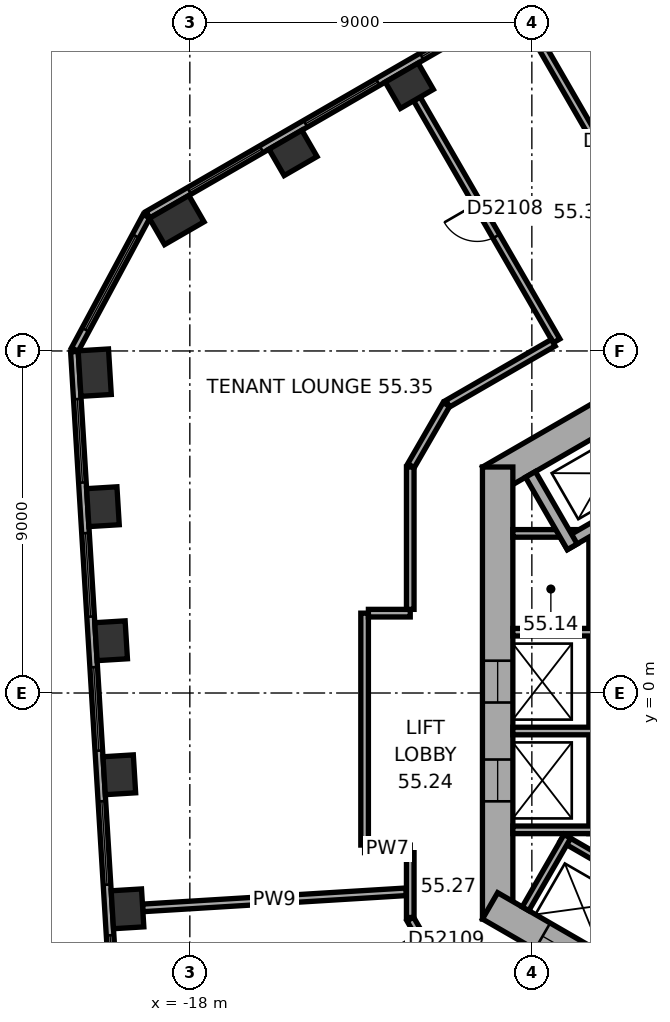
"""IFC4 building model, lengths in metres.
Left out: names, types, materials, properties, quantities, classifications, styles, units other than length and angle.
Written with IfcOpenShell. Run it as: python <this file> out.ifc"""

import sys

from ifc_helpers import new_model, si_unit, direction, frame, frame_2d, origin, origin_2d, place, context, subcontext, project, spatial, rectangle, extrude, element, fill, save


model = new_model("IFC4")
c1 = context("Model", 3, precision=1e-05, world=origin(), true_north=direction((0.0, 1.0)))
c2 = subcontext(c1, "Body", "Model", "MODEL_VIEW")
j1 = project(units=[si_unit("LENGTHUNIT", "METRE"), si_unit("PLANEANGLEUNIT", "RADIAN")], contexts=[c1])
p1 = place(None, origin())
s1 = spatial("IfcSite", under=j1, at=p1, CompositionType="ELEMENT")
p2 = place(p1, origin())
s2 = spatial("IfcBuilding", under=s1, at=p2, CompositionType="ELEMENT")
p3 = place(p2, frame((0.0, 0.0, 225.4)))
s3 = spatial("IfcBuildingStorey", under=s2, at=p3, CompositionType="ELEMENT", Elevation=225.4)
for number, where, z_axis, x_axis in (
    (1, (-12.225, 15.978, 0.0), (0.0, 0.0, 1.0), (-0.866, -0.5, 0.0)),
    (2, (-15.285, 14.211, 0.0), (0.0, 0.0, 1.0), (-0.866, -0.5, 0.0)),
):
    element("IfcColumn", number, at=place(p3, frame(where, z_axis=z_axis, x_axis=x_axis)), inside=s3, PredefinedType="COLUMN", context=c2, shape_type="SweptSolid", body=[
        extrude(rectangle(XDim=1.0, YDim=0.8, at=origin_2d()), origin(), (0.0, 0.0, 1.0), 3.7),
    ])
for number, where, z_axis, x_axis in (
    (3, (-18.345, 12.445, 0.0), (0.0, 0.0, 1.0), (-0.866, -0.5, 0.0)),
    (4, (-20.503, 8.429, 0.0), (0.0, 0.0, 1.0), (0.061, -0.998, 0.0)),
):
    element("IfcColumn", number, at=place(p3, frame(where, z_axis=z_axis, x_axis=x_axis)), inside=s3, PredefinedType="COLUMN", context=c2, shape_type="SweptSolid", body=[
        extrude(rectangle(XDim=1.2, YDim=0.8, at=origin_2d()), origin(), (0.0, 0.0, 1.0), 3.7),
    ])
for number, where, z_axis, x_axis in (
    (5, (-20.287, 4.902, 0.0), (0.0, 0.0, 1.0), (0.061, -0.998, 0.0)),
    (6, (-20.071, 1.375, 0.0), (0.0, 0.0, 1.0), (0.061, -0.998, 0.0)),
    (7, (-19.856, -2.152, 0.0), (0.0, 0.0, 1.0), (0.061, -0.998, 0.0)),
    (8, (-19.64, -5.679, 0.0), (0.0, 0.0, 1.0), (0.061, -0.998, 0.0)),
):
    element("IfcColumn", number, at=place(p3, frame(where, z_axis=z_axis, x_axis=x_axis)), inside=s3, PredefinedType="COLUMN", context=c2, shape_type="SweptSolid", body=[
        extrude(rectangle(XDim=1.0, YDim=0.8, at=origin_2d()), origin(), (0.0, 0.0, 1.0), 3.7),
    ])
p4 = place(p3, frame((0.2, 11.547, 0.0), z_axis=(0.0, 0.0, 1.0), x_axis=(-0.866023897231, -0.500002609418, 0.0)))
e9 = element("IfcWall", 9, at=p4, inside=s3, PredefinedType="SHEAR", context=c2, shape_type="SweptSolid", body=[
    extrude(rectangle(XDim=11.894, YDim=0.8, at=frame_2d((5.947, 0.0))), origin(), (0.0, 0.0, 1.0), 3.7),
])
p5 = place(p4, frame((6.147, 0.0, 0.0)))
e10 = element("IfcOpeningElement", 10, at=p5, cuts=e9, PredefinedType="OPENING", context=c2, shape_type="SweptSolid", body=[
    extrude(rectangle(XDim=1.5, YDim=2.1, at=frame_2d((0.75, 1.05))), frame((0.0, 0.41, 0.0), z_axis=(0.0, -1.0, 0.0), x_axis=(1.0, 0.0, 0.0)), (0.0, 0.0, 1.0), 0.82),
])
p6 = place(p4, frame((2.997, 0.0, 0.0)))
e11 = element("IfcOpeningElement", 11, at=p6, cuts=e9, PredefinedType="OPENING", context=c2, shape_type="SweptSolid", body=[
    extrude(rectangle(XDim=0.9, YDim=2.1, at=frame_2d((0.45, 1.05))), frame((0.0, 0.41, 0.0), z_axis=(0.0, -1.0, 0.0), x_axis=(1.0, 0.0, 0.0)), (0.0, 0.0, 1.0), 0.82),
])
p7 = place(p3, frame((-9.9, 5.947, 0.0), z_axis=(0.0, 0.0, 1.0), x_axis=(0.0, -1.0, 0.0)))
e12 = element("IfcWall", 12, at=p7, inside=s3, PredefinedType="SHEAR", context=c2, shape_type="SweptSolid", body=[
    extrude(rectangle(XDim=11.894, YDim=0.8, at=frame_2d((5.947, 0.0))), origin(), (0.0, 0.0, 1.0), 3.7),
])
p8 = place(p7, frame((5.097, 0.0, 0.0)))
e13 = element("IfcOpeningElement", 13, at=p8, cuts=e12, PredefinedType="OPENING", context=c2, shape_type="SweptSolid", body=[
    extrude(rectangle(XDim=1.1, YDim=2.1, at=frame_2d((0.55, 1.05))), frame((0.0, 0.41, 0.0), z_axis=(0.0, -1.0, 0.0), x_axis=(1.0, 0.0, 0.0)), (0.0, 0.0, 1.0), 0.82),
])
p9 = place(p7, frame((7.697, 0.0, 0.0)))
e14 = element("IfcOpeningElement", 14, at=p9, cuts=e12, PredefinedType="OPENING", context=c2, shape_type="SweptSolid", body=[
    extrude(rectangle(XDim=1.1, YDim=2.1, at=frame_2d((0.55, 1.05))), frame((0.0, 0.41, 0.0), z_axis=(0.0, -1.0, 0.0), x_axis=(1.0, 0.0, 0.0)), (0.0, 0.0, 1.0), 0.82),
])
p10 = place(p3, frame((-10.1, -5.6, 0.0), z_axis=(0.0, 0.0, 1.0), x_axis=(0.866023897231, -0.500002609418, 0.0)))
e15 = element("IfcWall", 15, at=p10, inside=s3, PredefinedType="SHEAR", context=c2, shape_type="SweptSolid", body=[
    extrude(rectangle(XDim=11.894, YDim=0.8, at=frame_2d((5.947, 0.0))), origin(), (0.0, 0.0, 1.0), 3.7),
])
p11 = place(p10, frame((6.147, 0.0, 0.0)))
e16 = element("IfcOpeningElement", 16, at=p11, cuts=e15, PredefinedType="OPENING", context=c2, shape_type="SweptSolid", body=[
    extrude(rectangle(XDim=1.5, YDim=2.1, at=frame_2d((0.75, 1.05))), frame((0.0, 0.41, 0.0), z_axis=(0.0, -1.0, 0.0), x_axis=(1.0, 0.0, 0.0)), (0.0, 0.0, 1.0), 0.82),
])
p12 = place(p10, frame((1.597, 0.0, 0.0)))
e17 = element("IfcOpeningElement", 17, at=p12, cuts=e15, PredefinedType="OPENING", context=c2, shape_type="SweptSolid", body=[
    extrude(rectangle(XDim=1.1, YDim=2.1, at=frame_2d((0.55, 1.05))), frame((0.0, 0.41, 0.0), z_axis=(0.0, -1.0, 0.0), x_axis=(1.0, 0.0, 0.0)), (0.0, 0.0, 1.0), 0.82),
])
p13 = place(p10, frame((4.197, 0.0, 0.0)))
e18 = element("IfcOpeningElement", 18, at=p13, cuts=e15, PredefinedType="OPENING", context=c2, shape_type="SweptSolid", body=[
    extrude(rectangle(XDim=1.1, YDim=2.1, at=frame_2d((0.55, 1.05))), frame((0.0, 0.41, 0.0), z_axis=(0.0, -1.0, 0.0), x_axis=(1.0, 0.0, 0.0)), (0.0, 0.0, 1.0), 0.82),
])
p14 = place(p3, frame((-2.786, 22.005, 0.0), z_axis=(0.0, 0.0, 1.0), x_axis=(-0.866026555358, -0.49999800541, 0.0)))
e19 = element("IfcWall", 19, at=p14, inside=s3, PredefinedType="STANDARD", context=c2, shape_type="SweptSolid", body=[
    extrude(rectangle(XDim=18.841, YDim=0.2, at=frame_2d((9.421, 0.0))), origin(), (0.0, 0.0, 1.0), 3.7),
])
p15 = place(p14, frame((1.254, 0.0, 0.9)))
e20 = element("IfcOpeningElement", 20, at=p15, cuts=e19, PredefinedType="OPENING", context=c2, shape_type="SweptSolid", body=[
    extrude(rectangle(XDim=2.2, YDim=2.0, at=frame_2d((1.1, 1.0))), frame((0.0, 0.11, 0.0), z_axis=(0.0, -1.0, 0.0), x_axis=(1.0, 0.0, 0.0)), (0.0, 0.0, 1.0), 0.22),
])
p16 = place(p14, frame((4.788, 0.0, 0.9)))
e21 = element("IfcOpeningElement", 21, at=p16, cuts=e19, PredefinedType="OPENING", context=c2, shape_type="SweptSolid", body=[
    extrude(rectangle(XDim=2.2, YDim=2.0, at=frame_2d((1.1, 1.0))), frame((0.0, 0.11, 0.0), z_axis=(0.0, -1.0, 0.0), x_axis=(1.0, 0.0, 0.0)), (0.0, 0.0, 1.0), 0.22),
])
p17 = place(p14, frame((8.321, 0.0, 0.9)))
e22 = element("IfcOpeningElement", 22, at=p17, cuts=e19, PredefinedType="OPENING", context=c2, shape_type="SweptSolid", body=[
    extrude(rectangle(XDim=2.2, YDim=2.0, at=frame_2d((1.1, 1.0))), frame((0.0, 0.11, 0.0), z_axis=(0.0, -1.0, 0.0), x_axis=(1.0, 0.0, 0.0)), (0.0, 0.0, 1.0), 0.22),
])
p18 = place(p14, frame((11.855, 0.0, 0.9)))
e23 = element("IfcOpeningElement", 23, at=p18, cuts=e19, PredefinedType="OPENING", context=c2, shape_type="SweptSolid", body=[
    extrude(rectangle(XDim=2.2, YDim=2.0, at=frame_2d((1.1, 1.0))), frame((0.0, 0.11, 0.0), z_axis=(0.0, -1.0, 0.0), x_axis=(1.0, 0.0, 0.0)), (0.0, 0.0, 1.0), 0.22),
])
p19 = place(p14, frame((15.389, 0.0, 0.9)))
e24 = element("IfcOpeningElement", 24, at=p19, cuts=e19, PredefinedType="OPENING", context=c2, shape_type="SweptSolid", body=[
    extrude(rectangle(XDim=2.2, YDim=2.0, at=frame_2d((1.1, 1.0))), frame((0.0, 0.11, 0.0), z_axis=(0.0, -1.0, 0.0), x_axis=(1.0, 0.0, 0.0)), (0.0, 0.0, 1.0), 0.22),
])
p20 = place(p3, frame((-19.141, 12.545, 0.0), z_axis=(0.0, 0.0, 1.0), x_axis=(-0.473306370921, -0.880897882416, 0.0)))
e25 = element("IfcWall", 25, at=p20, inside=s3, PredefinedType="STANDARD", context=c2, shape_type="SweptSolid", body=[
    extrude(rectangle(XDim=3.983, YDim=0.2, at=frame_2d((1.991, 0.0))), origin(), (0.0, 0.0, 1.0), 3.7),
])
p21 = place(p20, frame((0.591, 0.0, 0.9)))
e26 = element("IfcOpeningElement", 26, at=p21, cuts=e25, PredefinedType="OPENING", context=c2, shape_type="SweptSolid", body=[
    extrude(rectangle(XDim=2.8, YDim=2.0, at=frame_2d((1.4, 1.0))), frame((0.0, 0.11, 0.0), z_axis=(0.0, -1.0, 0.0), x_axis=(1.0, 0.0, 0.0)), (0.0, 0.0, 1.0), 0.22),
])
p22 = place(p3, frame((-21.038, 8.984, 0.0), z_axis=(0.0, 0.0, 1.0), x_axis=(0.061043935634, -0.998135079998, 0.0)))
e27 = element("IfcWall", 27, at=p22, inside=s3, PredefinedType="STANDARD", context=c2, shape_type="SweptSolid", body=[
    extrude(rectangle(XDim=18.841, YDim=0.2, at=frame_2d((9.421, 0.0))), origin(), (0.0, 0.0, 1.0), 3.7),
])
p23 = place(p22, frame((1.253, 0.0, 0.9)))
e28 = element("IfcOpeningElement", 28, at=p23, cuts=e27, PredefinedType="OPENING", context=c2, shape_type="SweptSolid", body=[
    extrude(rectangle(XDim=2.2, YDim=2.0, at=frame_2d((1.1, 1.0))), frame((0.0, 0.11, 0.0), z_axis=(0.0, -1.0, 0.0), x_axis=(1.0, 0.0, 0.0)), (0.0, 0.0, 1.0), 0.22),
])
p24 = place(p22, frame((4.786, 0.0, 0.9)))
e29 = element("IfcOpeningElement", 29, at=p24, cuts=e27, PredefinedType="OPENING", context=c2, shape_type="SweptSolid", body=[
    extrude(rectangle(XDim=2.2, YDim=2.0, at=frame_2d((1.1, 1.0))), frame((0.0, 0.11, 0.0), z_axis=(0.0, -1.0, 0.0), x_axis=(1.0, 0.0, 0.0)), (0.0, 0.0, 1.0), 0.22),
])
p25 = place(p22, frame((8.32, 0.0, 0.9)))
e30 = element("IfcOpeningElement", 30, at=p25, cuts=e27, PredefinedType="OPENING", context=c2, shape_type="SweptSolid", body=[
    extrude(rectangle(XDim=2.2, YDim=2.0, at=frame_2d((1.1, 1.0))), frame((0.0, 0.11, 0.0), z_axis=(0.0, -1.0, 0.0), x_axis=(1.0, 0.0, 0.0)), (0.0, 0.0, 1.0), 0.22),
])
p26 = place(p22, frame((11.854, 0.0, 0.9)))
e31 = element("IfcOpeningElement", 31, at=p26, cuts=e27, PredefinedType="OPENING", context=c2, shape_type="SweptSolid", body=[
    extrude(rectangle(XDim=2.2, YDim=2.0, at=frame_2d((1.1, 1.0))), frame((0.0, 0.11, 0.0), z_axis=(0.0, -1.0, 0.0), x_axis=(1.0, 0.0, 0.0)), (0.0, 0.0, 1.0), 0.22),
])
p27 = place(p22, frame((15.387, 0.0, 0.9)))
e32 = element("IfcOpeningElement", 32, at=p27, cuts=e27, PredefinedType="OPENING", context=c2, shape_type="SweptSolid", body=[
    extrude(rectangle(XDim=2.2, YDim=2.0, at=frame_2d((1.1, 1.0))), frame((0.0, 0.11, 0.0), z_axis=(0.0, -1.0, 0.0), x_axis=(1.0, 0.0, 0.0)), (0.0, 0.0, 1.0), 0.22),
])
p28 = place(p3, frame((-7.4, 4.3, 0.0), z_axis=(0.0, 0.0, 1.0), x_axis=(0.0, -1.0, 0.0)))
e33 = element("IfcWall", 33, at=p28, inside=s3, PredefinedType="PARTITIONING", context=c2, shape_type="SweptSolid", body=[
    extrude(rectangle(XDim=8.0, YDim=0.2, at=frame_2d((4.0, 0.0))), origin(), (0.0, 0.0, 1.0), 3.42),
])
for number, where, z_axis, x_axis in (
    (34, (-7.3, 4.2, 0.0), (0.0, 0.0, 1.0), (-1.0, 0.0, 0.0)),
    (35, (-7.3, 1.6, 0.0), (0.0, 0.0, 1.0), (-1.0, 0.0, 0.0)),
    (36, (-7.3, -1.0, 0.0), (0.0, 0.0, 1.0), (-1.0, 0.0, 0.0)),
    (37, (-7.3, -3.6, 0.0), (0.0, 0.0, 1.0), (-1.0, 0.0, 0.0)),
):
    element("IfcWall", number, at=place(p3, frame(where, z_axis=z_axis, x_axis=x_axis)), inside=s3, PredefinedType="PARTITIONING", context=c2, shape_type="SweptSolid", body=[
        extrude(rectangle(XDim=2.2, YDim=0.2, at=frame_2d((1.1, 0.0))), origin(), (0.0, 0.0, 1.0), 3.42),
    ])
p29 = place(p3, frame((-8.203, -3.809, 0.0), z_axis=(0.0, 0.0, 1.0), x_axis=(0.866028230842, -0.499995103361, 0.0)))
e38 = element("IfcWall", 38, at=p29, inside=s3, PredefinedType="PARTITIONING", context=c2, shape_type="SweptSolid", body=[
    extrude(rectangle(XDim=5.4, YDim=0.2, at=frame_2d((2.7, 0.0))), origin(), (0.0, 0.0, 1.0), 3.42),
])
p30 = place(p3, frame((-8.067, -3.772, 0.0), z_axis=(0.0, 0.0, 1.0), x_axis=(-0.50002983664, -0.866008176907, 0.0)))
e39 = element("IfcWall", 39, at=p30, inside=s3, PredefinedType="PARTITIONING", context=c2, shape_type="SweptSolid", body=[
    extrude(rectangle(XDim=2.2, YDim=0.2, at=frame_2d((1.1, 0.0))), origin(), (0.0, 0.0, 1.0), 3.42),
])
p31 = place(p3, frame((-5.24, 5.577, 0.0), z_axis=(0.0, 0.0, 1.0), x_axis=(-0.866014461049, -0.500018952895, 0.0)))
e40 = element("IfcWall", 40, at=p31, inside=s3, PredefinedType="SHEAR", context=c2, shape_type="SweptSolid", body=[
    extrude(rectangle(XDim=3.35, YDim=0.3, at=frame_2d((1.675, 0.0))), origin(), (0.0, 0.0, 1.0), 3.42),
])
p32 = place(p3, frame((-7.937, 3.847, 0.0), z_axis=(0.0, 0.0, 1.0), x_axis=(-0.50002983664, 0.866008176907, 0.0)))
e41 = element("IfcWall", 41, at=p32, inside=s3, PredefinedType="SHEAR", context=c2, shape_type="SweptSolid", body=[
    extrude(rectangle(XDim=2.2, YDim=0.3, at=frame_2d((1.1, 0.0))), origin(), (0.0, 0.0, 1.0), 3.42),
])
p33 = place(p3, frame((-19.241, -5.654, 0.0), z_axis=(0.0, 0.0, 1.0), x_axis=(0.998135538818, 0.061036432963, 0.0)))
e42 = element("IfcWall", 42, at=p33, inside=s3, PredefinedType="PARTITIONING", context=c2, shape_type="SweptSolid", body=[
    extrude(rectangle(XDim=6.944, YDim=0.2, at=frame_2d((3.472, 0.0))), origin(), (0.0, 0.0, 1.0), 2.87),
])
p34 = place(p3, frame((-13.401, -4.101, 0.0), z_axis=(0.0, 0.0, 1.0), x_axis=(1.0, 0.0, 0.0)))
e43 = element("IfcWall", 43, at=p34, inside=s3, PredefinedType="PARTITIONING", context=c2, shape_type="SweptSolid", body=[
    extrude(rectangle(XDim=1.201, YDim=0.2, at=frame_2d((0.601, 0.0))), origin(), (0.0, 0.0, 1.0), 3.42),
])
p35 = place(p3, frame((-13.401, 2.101, 0.0), z_axis=(0.0, 0.0, 1.0), x_axis=(0.0, -1.0, 0.0)))
e44 = element("IfcWall", 44, at=p35, inside=s3, PredefinedType="PARTITIONING", context=c2, shape_type="SweptSolid", body=[
    extrude(rectangle(XDim=6.102, YDim=0.2, at=frame_2d((3.051, 0.0))), origin(), (0.0, 0.0, 1.0), 3.42),
])
p36 = place(p3, frame((-12.2, -5.947, 0.0), z_axis=(0.0, 0.0, 1.0), x_axis=(0.500022797313, -0.86601224135, 0.0)))
e45 = element("IfcWall", 45, at=p36, inside=s3, PredefinedType="PARTITIONING", context=c2, shape_type="SweptSolid", body=[
    extrude(rectangle(XDim=1.9, YDim=0.2, at=frame_2d((0.95, 0.0))), origin(), (0.0, 0.0, 1.0), 3.42),
])
p37 = place(p36, frame((0.45, 0.0, 0.0)))
e46 = element("IfcOpeningElement", 46, at=p37, cuts=e45, PredefinedType="OPENING", context=c2, shape_type="SweptSolid", body=[
    extrude(rectangle(XDim=1.0, YDim=2.1, at=frame_2d((0.5, 1.05))), frame((0.0, 0.11, 0.0), z_axis=(0.0, -1.0, 0.0), x_axis=(1.0, 0.0, 0.0)), (0.0, 0.0, 1.0), 0.22),
])
p38 = place(p3, frame((-12.2, -4.201, 0.0), z_axis=(0.0, 0.0, 1.0), x_axis=(0.0, -1.0, 0.0)))
e47 = element("IfcWall", 47, at=p38, inside=s3, PredefinedType="PARTITIONING", context=c2, shape_type="SweptSolid", body=[
    extrude(rectangle(XDim=1.706, YDim=0.2, at=frame_2d((0.853, 0.0))), origin(), (0.0, 0.0, 1.0), 3.42),
])
p39 = place(p3, frame((-12.2, 2.101, 0.0), z_axis=(0.0, 0.0, 1.0), x_axis=(-1.0, 0.0, 0.0)))
e48 = element("IfcWall", 48, at=p39, inside=s3, PredefinedType="PARTITIONING", context=c2, shape_type="SweptSolid", body=[
    extrude(rectangle(XDim=1.101, YDim=0.2, at=frame_2d((0.551, 0.0))), origin(), (0.0, 0.0, 1.0), 3.42),
])
p40 = place(p3, frame((-12.2, 5.947, 0.0), z_axis=(0.0, 0.0, 1.0), x_axis=(0.0, -1.0, 0.0)))
e49 = element("IfcWall", 49, at=p40, inside=s3, PredefinedType="PARTITIONING", context=c2, shape_type="SweptSolid", body=[
    extrude(rectangle(XDim=3.746, YDim=0.2, at=frame_2d((1.873, 0.0))), origin(), (0.0, 0.0, 1.0), 3.42),
])
p41 = place(p3, frame((-12.025, 15.632, 0.0), z_axis=(0.0, 0.0, 1.0), x_axis=(0.499983153418, -0.866035129944, 0.0)))
e50 = element("IfcWall", 50, at=p41, inside=s3, PredefinedType="PARTITIONING", context=c2, shape_type="SweptSolid", body=[
    extrude(rectangle(XDim=7.35, YDim=0.2, at=frame_2d((3.675, 0.0))), origin(), (0.0, 0.0, 1.0), 3.42),
])
p42 = place(p41, frame((3.175, 0.0, 0.0)))
e51 = element("IfcOpeningElement", 51, at=p42, cuts=e50, PredefinedType="OPENING", context=c2, shape_type="SweptSolid", body=[
    extrude(rectangle(XDim=1.0, YDim=2.1, at=frame_2d((0.5, 1.05))), frame((0.0, 0.11, 0.0), z_axis=(0.0, -1.0, 0.0), x_axis=(1.0, 0.0, 0.0)), (0.0, 0.0, 1.0), 0.22),
])
p43 = place(p3, frame((-11.25, 7.592, 0.0), z_axis=(0.0, 0.0, 1.0), x_axis=(-0.499964847546, -0.866045698112, 0.0)))
e52 = element("IfcWall", 52, at=p43, inside=s3, PredefinedType="PARTITIONING", context=c2, shape_type="SweptSolid", body=[
    extrude(rectangle(XDim=1.86, YDim=0.2, at=frame_2d((0.93, 0.0))), origin(), (0.0, 0.0, 1.0), 3.42),
])
p44 = place(p3, frame((-8.965, 17.399, 0.0), z_axis=(0.0, 0.0, 1.0), x_axis=(0.499993683172, -0.866029050776, 0.0)))
e53 = element("IfcWall", 53, at=p44, inside=s3, PredefinedType="PARTITIONING", context=c2, shape_type="SweptSolid", body=[
    extrude(rectangle(XDim=7.35, YDim=0.2, at=frame_2d((3.675, 0.0))), origin(), (0.0, 0.0, 1.0), 2.87),
])
p45 = place(p44, frame((3.175, 0.0, 0.0)))
e54 = element("IfcOpeningElement", 54, at=p45, cuts=e53, PredefinedType="OPENING", context=c2, shape_type="SweptSolid", body=[
    extrude(rectangle(XDim=1.0, YDim=2.1, at=frame_2d((0.5, 1.05))), frame((0.0, 0.11, 0.0), z_axis=(0.0, -1.0, 0.0), x_axis=(1.0, 0.0, 0.0)), (0.0, 0.0, 1.0), 0.22),
])
p46 = place(p3, frame((-8.437, 9.217, 0.0), z_axis=(0.0, 0.0, 1.0), x_axis=(-0.866005660673, -0.500034194513, 0.0)))
e55 = element("IfcWall", 55, at=p46, inside=s3, PredefinedType="PARTITIONING", context=c2, shape_type="SweptSolid", body=[
    extrude(rectangle(XDim=3.209, YDim=0.2, at=frame_2d((1.604, 0.0))), origin(), (0.0, 0.0, 1.0), 3.42),
])
p47 = place(p17, origin())
e56 = element("IfcWindow", 56, at=p47, inside=s3, PartitioningType="SINGLE_PANEL", PredefinedType="WINDOW", context=c2, shape_type="SweptSolid", body=[
    extrude(rectangle(XDim=2.2, YDim=2.0, at=frame_2d((1.1, 1.0))), frame((0.0, 0.03, 0.0), z_axis=(0.0, -1.0, 0.0), x_axis=(1.0, 0.0, 0.0)), (0.0, 0.0, 1.0), 0.06),
])
fill(e22, e56)
p48 = place(p18, origin())
e57 = element("IfcWindow", 57, at=p48, inside=s3, PartitioningType="SINGLE_PANEL", PredefinedType="WINDOW", context=c2, shape_type="SweptSolid", body=[
    extrude(rectangle(XDim=2.2, YDim=2.0, at=frame_2d((1.1, 1.0))), frame((0.0, 0.03, 0.0), z_axis=(0.0, -1.0, 0.0), x_axis=(1.0, 0.0, 0.0)), (0.0, 0.0, 1.0), 0.06),
])
fill(e23, e57)
p49 = place(p19, origin())
e58 = element("IfcWindow", 58, at=p49, inside=s3, PartitioningType="SINGLE_PANEL", PredefinedType="WINDOW", context=c2, shape_type="SweptSolid", body=[
    extrude(rectangle(XDim=2.2, YDim=2.0, at=frame_2d((1.1, 1.0))), frame((0.0, 0.03, 0.0), z_axis=(0.0, -1.0, 0.0), x_axis=(1.0, 0.0, 0.0)), (0.0, 0.0, 1.0), 0.06),
])
fill(e24, e58)
p50 = place(p21, origin())
e59 = element("IfcWindow", 59, at=p50, inside=s3, PartitioningType="SINGLE_PANEL", PredefinedType="WINDOW", context=c2, shape_type="SweptSolid", body=[
    extrude(rectangle(XDim=2.8, YDim=2.0, at=frame_2d((1.4, 1.0))), frame((0.0, 0.03, 0.0), z_axis=(0.0, -1.0, 0.0), x_axis=(1.0, 0.0, 0.0)), (0.0, 0.0, 1.0), 0.06),
])
fill(e26, e59)
p51 = place(p23, origin())
e60 = element("IfcWindow", 60, at=p51, inside=s3, PartitioningType="SINGLE_PANEL", PredefinedType="WINDOW", context=c2, shape_type="SweptSolid", body=[
    extrude(rectangle(XDim=2.2, YDim=2.0, at=frame_2d((1.1, 1.0))), frame((0.0, 0.03, 0.0), z_axis=(0.0, -1.0, 0.0), x_axis=(1.0, 0.0, 0.0)), (0.0, 0.0, 1.0), 0.06),
])
fill(e28, e60)
p52 = place(p24, origin())
e61 = element("IfcWindow", 61, at=p52, inside=s3, PartitioningType="SINGLE_PANEL", PredefinedType="WINDOW", context=c2, shape_type="SweptSolid", body=[
    extrude(rectangle(XDim=2.2, YDim=2.0, at=frame_2d((1.1, 1.0))), frame((0.0, 0.03, 0.0), z_axis=(0.0, -1.0, 0.0), x_axis=(1.0, 0.0, 0.0)), (0.0, 0.0, 1.0), 0.06),
])
fill(e29, e61)
p53 = place(p25, origin())
e62 = element("IfcWindow", 62, at=p53, inside=s3, PartitioningType="SINGLE_PANEL", PredefinedType="WINDOW", context=c2, shape_type="SweptSolid", body=[
    extrude(rectangle(XDim=2.2, YDim=2.0, at=frame_2d((1.1, 1.0))), frame((0.0, 0.03, 0.0), z_axis=(0.0, -1.0, 0.0), x_axis=(1.0, 0.0, 0.0)), (0.0, 0.0, 1.0), 0.06),
])
fill(e30, e62)
p54 = place(p26, origin())
e63 = element("IfcWindow", 63, at=p54, inside=s3, PartitioningType="SINGLE_PANEL", PredefinedType="WINDOW", context=c2, shape_type="SweptSolid", body=[
    extrude(rectangle(XDim=2.2, YDim=2.0, at=frame_2d((1.1, 1.0))), frame((0.0, 0.03, 0.0), z_axis=(0.0, -1.0, 0.0), x_axis=(1.0, 0.0, 0.0)), (0.0, 0.0, 1.0), 0.06),
])
fill(e31, e63)
p55 = place(p27, origin())
e64 = element("IfcWindow", 64, at=p55, inside=s3, PartitioningType="SINGLE_PANEL", PredefinedType="WINDOW", context=c2, shape_type="SweptSolid", body=[
    extrude(rectangle(XDim=2.2, YDim=2.0, at=frame_2d((1.1, 1.0))), frame((0.0, 0.03, 0.0), z_axis=(0.0, -1.0, 0.0), x_axis=(1.0, 0.0, 0.0)), (0.0, 0.0, 1.0), 0.06),
])
fill(e32, e64)
p56 = place(p8, origin())
e65 = element("IfcDoor", 65, at=p56, inside=s3, OperationType="DOUBLE_DOOR_SLIDING", PredefinedType="DOOR", context=c2, shape_type="SweptSolid", body=[
    extrude(rectangle(XDim=1.1, YDim=2.1, at=frame_2d((0.55, 1.05))), frame((0.0, 0.025, 0.0), z_axis=(0.0, -1.0, 0.0), x_axis=(1.0, 0.0, 0.0)), (0.0, 0.0, 1.0), 0.05),
])
fill(e13, e65)
p57 = place(p9, origin())
e66 = element("IfcDoor", 66, at=p57, inside=s3, OperationType="DOUBLE_DOOR_SLIDING", PredefinedType="DOOR", context=c2, shape_type="SweptSolid", body=[
    extrude(rectangle(XDim=1.1, YDim=2.1, at=frame_2d((0.55, 1.05))), frame((0.0, 0.025, 0.0), z_axis=(0.0, -1.0, 0.0), x_axis=(1.0, 0.0, 0.0)), (0.0, 0.0, 1.0), 0.05),
])
fill(e14, e66)
p58 = place(p12, origin())
e67 = element("IfcDoor", 67, at=p58, inside=s3, OperationType="DOUBLE_DOOR_SLIDING", PredefinedType="DOOR", context=c2, shape_type="SweptSolid", body=[
    extrude(rectangle(XDim=1.1, YDim=2.1, at=frame_2d((0.55, 1.05))), frame((0.0, 0.025, 0.0), z_axis=(0.0, -1.0, 0.0), x_axis=(1.0, 0.0, 0.0)), (0.0, 0.0, 1.0), 0.05),
])
fill(e17, e67)
p59 = place(p42, origin())
e68 = element("IfcDoor", 68, at=p59, inside=s3, OperationType="SINGLE_SWING_LEFT", PredefinedType="DOOR", context=c2, shape_type="SweptSolid", body=[
    extrude(rectangle(XDim=1.0, YDim=2.1, at=frame_2d((0.5, 1.05))), frame((0.0, 0.025, 0.0), z_axis=(0.0, -1.0, 0.0), x_axis=(1.0, 0.0, 0.0)), (0.0, 0.0, 1.0), 0.05),
])
fill(e51, e68)
p60 = place(p37, origin())
e69 = element("IfcDoor", 69, at=p60, inside=s3, OperationType="SINGLE_SWING_LEFT", PredefinedType="DOOR", context=c2, shape_type="SweptSolid", body=[
    extrude(rectangle(XDim=1.0, YDim=2.1, at=frame_2d((0.5, 1.05))), frame((0.0, 0.025, 0.0), z_axis=(0.0, -1.0, 0.0), x_axis=(1.0, 0.0, 0.0)), (0.0, 0.0, 1.0), 0.05),
])
fill(e46, e69)
save(model, sys.argv[1])
